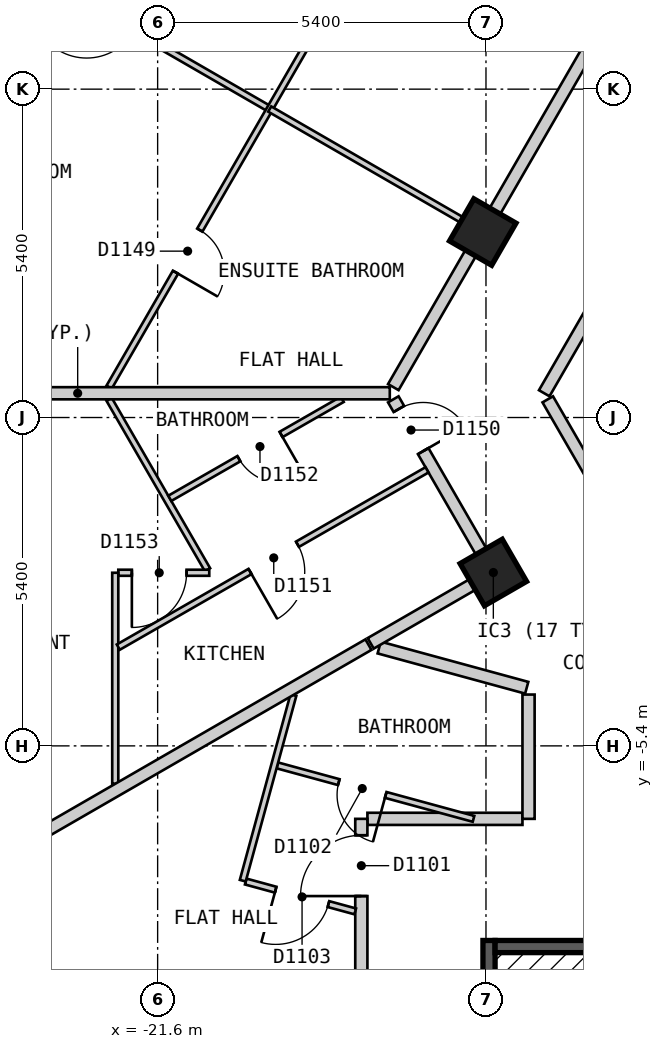
"""IFC4 building model, lengths in metres.
Left out: names, types, materials, properties, quantities, classifications, styles, units other than length and angle.
Written with IfcOpenShell. Run it as: python <this file> out.ifc"""

import sys

from ifc_helpers import new_model, si_unit, direction, frame, frame_2d, origin, origin_2d, place, context, subcontext, project, spatial, polyline, rectangle, outline, extrude, element, fill, save


model = new_model("IFC4")
c1 = context("Model", 3, precision=1e-05, world=origin(), true_north=direction((0.0, 1.0)))
c2 = subcontext(c1, "Body", "Model", "MODEL_VIEW")
j1 = project(units=[si_unit("LENGTHUNIT", "METRE"), si_unit("PLANEANGLEUNIT", "RADIAN")], contexts=[c1])
p1 = place(None, origin())
s1 = spatial("IfcSite", under=j1, at=p1, CompositionType="ELEMENT")
p2 = place(p1, origin())
s2 = spatial("IfcBuilding", under=s1, at=p2, CompositionType="ELEMENT")
p3 = place(p2, frame((0.0, 0.0, 150.6)))
s3 = spatial("IfcBuildingStorey", under=s2, at=p3, CompositionType="ELEMENT", Elevation=150.6)
for number, where, z_axis, x_axis in (
    (1, (-16.079, -2.549, 0.0), (0.0, 0.0, 1.0), (0.5, -0.866, 0.0)),
    (2, (-16.253, 3.05, 0.0), (0.0, 0.0, 1.0), (-0.5, -0.866, 0.0)),
):
    element("IfcColumn", number, at=place(p3, frame(where, z_axis=z_axis, x_axis=x_axis)), inside=s3, PredefinedType="COLUMN", context=c2, shape_type="SweptSolid", body=[
        extrude(rectangle(XDim=0.8, YDim=0.8, at=origin_2d()), origin(), (0.0, 0.0, 1.0), 3.0),
    ])
p4 = place(p3, frame((-16.555, 23.025, 0.0), z_axis=(0.0, 0.0, 1.0), x_axis=(-0.500020536353, -0.866013546791, 0.0)))
e3 = element("IfcWall", 3, at=p4, inside=s3, PredefinedType="SOLIDWALL", context=c2, shape_type="SweptSolid", body=[
    extrude(outline(polyline([(0.0, -0.15), (23.325, -0.15), (23.245, 0.15), (0.08, 0.15), (0.0, -0.15)])), origin(), (0.0, 0.0, 1.0), 2.6),
])
p5 = place(p4, frame((1.314, 0.0, 0.15)))
e4 = element("IfcOpeningElement", 4, at=p5, cuts=e3, PredefinedType="OPENING", context=c2, shape_type="SweptSolid", body=[
    extrude(rectangle(XDim=1.5, YDim=2.1, at=frame_2d((0.75, 1.05))), frame((0.0, 0.16, 0.0), z_axis=(0.0, -1.0, 0.0), x_axis=(1.0, 0.0, 0.0)), (0.0, 0.0, 1.0), 0.32),
])
p6 = place(p4, frame((4.056, 0.0, 0.15)))
e5 = element("IfcOpeningElement", 5, at=p6, cuts=e3, PredefinedType="OPENING", context=c2, shape_type="SweptSolid", body=[
    extrude(rectangle(XDim=1.5, YDim=2.1, at=frame_2d((0.75, 1.05))), frame((0.0, 0.16, 0.0), z_axis=(0.0, -1.0, 0.0), x_axis=(1.0, 0.0, 0.0)), (0.0, 0.0, 1.0), 0.32),
])
p7 = place(p4, frame((6.799, 0.0, 0.15)))
e6 = element("IfcOpeningElement", 6, at=p7, cuts=e3, PredefinedType="OPENING", context=c2, shape_type="SweptSolid", body=[
    extrude(rectangle(XDim=1.5, YDim=2.1, at=frame_2d((0.75, 1.05))), frame((0.0, 0.16, 0.0), z_axis=(0.0, -1.0, 0.0), x_axis=(1.0, 0.0, 0.0)), (0.0, 0.0, 1.0), 0.32),
])
p8 = place(p4, frame((9.541, 0.0, 0.15)))
e7 = element("IfcOpeningElement", 7, at=p8, cuts=e3, PredefinedType="OPENING", context=c2, shape_type="SweptSolid", body=[
    extrude(rectangle(XDim=1.5, YDim=2.1, at=frame_2d((0.75, 1.05))), frame((0.0, 0.16, 0.0), z_axis=(0.0, -1.0, 0.0), x_axis=(1.0, 0.0, 0.0)), (0.0, 0.0, 1.0), 0.32),
])
p9 = place(p4, frame((12.285, 0.0, 0.15)))
e8 = element("IfcOpeningElement", 8, at=p9, cuts=e3, PredefinedType="OPENING", context=c2, shape_type="SweptSolid", body=[
    extrude(rectangle(XDim=1.5, YDim=2.1, at=frame_2d((0.75, 1.05))), frame((0.0, 0.16, 0.0), z_axis=(0.0, -1.0, 0.0), x_axis=(1.0, 0.0, 0.0)), (0.0, 0.0, 1.0), 0.32),
])
p10 = place(p4, frame((15.027, 0.0, 0.15)))
e9 = element("IfcOpeningElement", 9, at=p10, cuts=e3, PredefinedType="OPENING", context=c2, shape_type="SweptSolid", body=[
    extrude(rectangle(XDim=1.5, YDim=2.1, at=frame_2d((0.75, 1.05))), frame((0.0, 0.16, 0.0), z_axis=(0.0, -1.0, 0.0), x_axis=(1.0, 0.0, 0.0)), (0.0, 0.0, 1.0), 0.32),
])
p11 = place(p4, frame((17.769, 0.0, 0.15)))
e10 = element("IfcOpeningElement", 10, at=p11, cuts=e3, PredefinedType="OPENING", context=c2, shape_type="SweptSolid", body=[
    extrude(rectangle(XDim=1.5, YDim=2.1, at=frame_2d((0.75, 1.05))), frame((0.0, 0.16, 0.0), z_axis=(0.0, -1.0, 0.0), x_axis=(1.0, 0.0, 0.0)), (0.0, 0.0, 1.0), 0.32),
])
p12 = place(p4, frame((20.512, 0.0, 0.15)))
e11 = element("IfcOpeningElement", 11, at=p12, cuts=e3, PredefinedType="OPENING", context=c2, shape_type="SweptSolid", body=[
    extrude(rectangle(XDim=1.5, YDim=2.1, at=frame_2d((0.75, 1.05))), frame((0.0, 0.16, 0.0), z_axis=(0.0, -1.0, 0.0), x_axis=(1.0, 0.0, 0.0)), (0.0, 0.0, 1.0), 0.32),
])
p13 = place(p3, frame((-28.218, -2.025, 0.0), z_axis=(0.0, 0.0, 1.0), x_axis=(0.500017503135, -0.866015298109, 0.0)))
e12 = element("IfcWall", 12, at=p13, inside=s3, PredefinedType="SOLIDWALL", context=c2, shape_type="SweptSolid", body=[
    extrude(outline(polyline([(0.0, -0.15), (24.711, -0.15), (24.631, 0.15), (0.08, 0.15), (0.0, -0.15)])), origin(), (0.0, 0.0, 1.0), 2.6),
])
p14 = place(p13, frame((1.4, 0.0, 0.15)))
e13 = element("IfcOpeningElement", 13, at=p14, cuts=e12, PredefinedType="OPENING", context=c2, shape_type="SweptSolid", body=[
    extrude(rectangle(XDim=1.5, YDim=2.1, at=frame_2d((0.75, 1.05))), frame((0.0, 0.16, 0.0), z_axis=(0.0, -1.0, 0.0), x_axis=(1.0, 0.0, 0.0)), (0.0, 0.0, 1.0), 0.32),
])
p15 = place(p13, frame((4.316, 0.0, 0.15)))
e14 = element("IfcOpeningElement", 14, at=p15, cuts=e12, PredefinedType="OPENING", context=c2, shape_type="SweptSolid", body=[
    extrude(rectangle(XDim=1.5, YDim=2.1, at=frame_2d((0.75, 1.05))), frame((0.0, 0.16, 0.0), z_axis=(0.0, -1.0, 0.0), x_axis=(1.0, 0.0, 0.0)), (0.0, 0.0, 1.0), 0.32),
])
p16 = place(p13, frame((7.231, 0.0, 0.15)))
e15 = element("IfcOpeningElement", 15, at=p16, cuts=e12, PredefinedType="OPENING", context=c2, shape_type="SweptSolid", body=[
    extrude(rectangle(XDim=1.5, YDim=2.1, at=frame_2d((0.75, 1.05))), frame((0.0, 0.16, 0.0), z_axis=(0.0, -1.0, 0.0), x_axis=(1.0, 0.0, 0.0)), (0.0, 0.0, 1.0), 0.32),
])
p17 = place(p13, frame((10.147, 0.0, 0.15)))
e16 = element("IfcOpeningElement", 16, at=p17, cuts=e12, PredefinedType="OPENING", context=c2, shape_type="SweptSolid", body=[
    extrude(rectangle(XDim=1.5, YDim=2.1, at=frame_2d((0.75, 1.05))), frame((0.0, 0.16, 0.0), z_axis=(0.0, -1.0, 0.0), x_axis=(1.0, 0.0, 0.0)), (0.0, 0.0, 1.0), 0.32),
])
p18 = place(p13, frame((13.062, 0.0, 0.15)))
e17 = element("IfcOpeningElement", 17, at=p18, cuts=e12, PredefinedType="OPENING", context=c2, shape_type="SweptSolid", body=[
    extrude(rectangle(XDim=1.5, YDim=2.1, at=frame_2d((0.75, 1.05))), frame((0.0, 0.16, 0.0), z_axis=(0.0, -1.0, 0.0), x_axis=(1.0, 0.0, 0.0)), (0.0, 0.0, 1.0), 0.32),
])
p19 = place(p13, frame((15.977, 0.0, 0.15)))
e18 = element("IfcOpeningElement", 18, at=p19, cuts=e12, PredefinedType="OPENING", context=c2, shape_type="SweptSolid", body=[
    extrude(rectangle(XDim=1.5, YDim=2.1, at=frame_2d((0.75, 1.05))), frame((0.0, 0.16, 0.0), z_axis=(0.0, -1.0, 0.0), x_axis=(1.0, 0.0, 0.0)), (0.0, 0.0, 1.0), 0.32),
])
p20 = place(p13, frame((18.893, 0.0, 0.15)))
e19 = element("IfcOpeningElement", 19, at=p20, cuts=e12, PredefinedType="OPENING", context=c2, shape_type="SweptSolid", body=[
    extrude(rectangle(XDim=1.5, YDim=2.1, at=frame_2d((0.75, 1.05))), frame((0.0, 0.16, 0.0), z_axis=(0.0, -1.0, 0.0), x_axis=(1.0, 0.0, 0.0)), (0.0, 0.0, 1.0), 0.32),
])
p21 = place(p13, frame((21.809, 0.0, 0.15)))
e20 = element("IfcOpeningElement", 20, at=p21, cuts=e12, PredefinedType="OPENING", context=c2, shape_type="SweptSolid", body=[
    extrude(rectangle(XDim=1.5, YDim=2.1, at=frame_2d((0.75, 1.05))), frame((0.0, 0.16, 0.0), z_axis=(0.0, -1.0, 0.0), x_axis=(1.0, 0.0, 0.0)), (0.0, 0.0, 1.0), 0.32),
])
p22 = place(p3, frame((-15.184, 0.299, 0.0), z_axis=(0.0, 0.0, 1.0), x_axis=(0.500149577091, -0.865939028186, 0.0)))
e21 = element("IfcWall", 21, at=p22, inside=s3, PredefinedType="PARTITIONING", context=c2, shape_type="SweptSolid", body=[
    extrude(rectangle(XDim=3.463, YDim=0.2, at=frame_2d((1.732, 0.0))), origin(), (0.0, 0.0, 1.0), 2.6),
])
p23 = place(p3, frame((-17.724, 0.299, 0.0), z_axis=(0.0, 0.0, 1.0), x_axis=(0.499910220442, -0.866077231832, 0.0)))
e22 = element("IfcWall", 22, at=p23, inside=s3, PredefinedType="PARTITIONING", context=c2, shape_type="SweptSolid", body=[
    extrude(rectangle(XDim=3.189, YDim=0.2, at=frame_2d((1.594, 0.0))), origin(), (0.0, 0.0, 1.0), 2.6),
])
p24 = place(p23, frame((0.183, 0.0, 0.0)))
e23 = element("IfcOpeningElement", 23, at=p24, cuts=e22, PredefinedType="OPENING", context=c2, shape_type="SweptSolid", body=[
    extrude(rectangle(XDim=0.8, YDim=2.1, at=frame_2d((0.4, 1.05))), frame((0.0, 0.11, 0.0), z_axis=(0.0, -1.0, 0.0), x_axis=(1.0, 0.0, 0.0)), (0.0, 0.0, 1.0), 0.22),
])
p25 = place(p3, frame((-18.15, -6.6, 0.0), z_axis=(0.0, 0.0, 1.0), x_axis=(1.0, 0.0, 0.0)))
e24 = element("IfcWall", 24, at=p25, inside=s3, PredefinedType="PARTITIONING", context=c2, shape_type="SweptSolid", body=[
    extrude(rectangle(XDim=2.55, YDim=0.2, at=frame_2d((1.275, 0.0))), origin(), (0.0, 0.0, 1.0), 2.6),
])
p26 = place(p3, frame((-15.242, 0.399, 0.0), z_axis=(0.0, 0.0, 1.0), x_axis=(0.499953615651, 0.866052182145, 0.0)))
e25 = element("IfcWall", 25, at=p26, inside=s3, PredefinedType="PARTITIONING", context=c2, shape_type="SweptSolid", body=[
    extrude(rectangle(XDim=8.777, YDim=0.2, at=frame_2d((4.388, 0.0))), origin(), (0.0, 0.0, 1.0), 2.6),
])
p27 = place(p26, frame((3.938, 0.0, 0.0)))
e26 = element("IfcOpeningElement", 26, at=p27, cuts=e25, PredefinedType="OPENING", context=c2, shape_type="SweptSolid", body=[
    extrude(rectangle(XDim=0.9, YDim=2.1, at=frame_2d((0.45, 1.05))), frame((0.0, 0.11, 0.0), z_axis=(0.0, -1.0, 0.0), x_axis=(1.0, 0.0, 0.0)), (0.0, 0.0, 1.0), 0.22),
])
p28 = place(p3, frame((-17.724, 0.5, 0.0), z_axis=(0.0, 0.0, 1.0), x_axis=(0.499992388462, 0.866029798263, 0.0)))
e27 = element("IfcWall", 27, at=p28, inside=s3, PredefinedType="PARTITIONING", context=c2, shape_type="SweptSolid", body=[
    extrude(rectangle(XDim=16.859, YDim=0.2, at=frame_2d((8.429, 0.0))), origin(), (0.0, 0.0, 1.0), 2.6),
])
p29 = place(p28, frame((10.672, 0.0, 0.0)))
e28 = element("IfcOpeningElement", 28, at=p29, cuts=e27, PredefinedType="OPENING", context=c2, shape_type="SweptSolid", body=[
    extrude(rectangle(XDim=1.0, YDim=2.1, at=frame_2d((0.5, 1.05))), frame((0.0, 0.11, 0.0), z_axis=(0.0, -1.0, 0.0), x_axis=(1.0, 0.0, 0.0)), (0.0, 0.0, 1.0), 0.22),
])
p30 = place(p3, frame((-15.5, -6.6, 0.0), z_axis=(0.0, 0.0, 1.0), x_axis=(0.0, 1.0, 0.0)))
e29 = element("IfcWall", 29, at=p30, inside=s3, PredefinedType="PARTITIONING", context=c2, shape_type="SweptSolid", body=[
    extrude(rectangle(XDim=2.044, YDim=0.2, at=frame_2d((1.022, 0.0))), origin(), (0.0, 0.0, 1.0), 2.6),
])
p31 = place(p3, frame((-18.25, -10.478, 0.0), z_axis=(0.0, 0.0, 1.0), x_axis=(0.0, 1.0, 0.0)))
e30 = element("IfcWall", 30, at=p31, inside=s3, PredefinedType="PARTITIONING", context=c2, shape_type="SweptSolid", body=[
    extrude(rectangle(XDim=3.878, YDim=0.2, at=frame_2d((1.939, 0.0))), origin(), (0.0, 0.0, 1.0), 2.6),
])
p32 = place(p31, frame((2.608, 0.0, 0.0)))
e31 = element("IfcOpeningElement", 31, at=p32, cuts=e30, PredefinedType="OPENING", context=c2, shape_type="SweptSolid", body=[
    extrude(rectangle(XDim=1.0, YDim=2.1, at=frame_2d((0.5, 1.05))), frame((0.0, 0.11, 0.0), z_axis=(0.0, -1.0, 0.0), x_axis=(1.0, 0.0, 0.0)), (0.0, 0.0, 1.0), 0.22),
])
p33 = place(p3, frame((-22.398, 0.299, 0.0), z_axis=(0.0, 0.0, 1.0), x_axis=(0.50004249738, -0.86600086652, 0.0)))
e32 = element("IfcWall", 32, at=p33, inside=s3, PredefinedType="PARTITIONING", context=c2, shape_type="SweptSolid", body=[
    extrude(rectangle(XDim=3.236, YDim=0.1, at=frame_2d((1.618, 0.0))), origin(), (0.0, 0.0, 1.0), 2.6),
])
p34 = place(p3, frame((-19.631, -5.721, 0.0), z_axis=(0.0, 0.0, 1.0), x_axis=(0.964816035809, -0.262925877475, 0.0)))
e33 = element("IfcWall", 33, at=p34, inside=s3, PredefinedType="PARTITIONING", context=c2, shape_type="SweptSolid", body=[
    extrude(rectangle(XDim=3.344, YDim=0.1, at=frame_2d((1.672, 0.0))), origin(), (0.0, 0.0, 1.0), 2.6),
])
p35 = place(p34, frame((1.047, 0.0, 0.0)))
e34 = element("IfcOpeningElement", 34, at=p35, cuts=e33, PredefinedType="OPENING", context=c2, shape_type="SweptSolid", body=[
    extrude(rectangle(XDim=0.8, YDim=2.1, at=frame_2d((0.4, 1.05))), frame((0.0, 0.06, 0.0), z_axis=(0.0, -1.0, 0.0), x_axis=(1.0, 0.0, 0.0)), (0.0, 0.0, 1.0), 0.12),
])
p36 = place(p3, frame((-20.151, -7.631, 0.0), z_axis=(0.0, 0.0, 1.0), x_axis=(0.964784947449, -0.263039930765, 0.0)))
e35 = element("IfcWall", 35, at=p36, inside=s3, PredefinedType="PARTITIONING", context=c2, shape_type="SweptSolid", body=[
    extrude(rectangle(XDim=1.866, YDim=0.1, at=frame_2d((0.933, 0.0))), origin(), (0.0, 0.0, 1.0), 2.6),
])
p37 = place(p36, frame((0.51, 0.0, 0.0)))
e36 = element("IfcOpeningElement", 36, at=p37, cuts=e35, PredefinedType="OPENING", context=c2, shape_type="SweptSolid", body=[
    extrude(rectangle(XDim=0.9, YDim=2.1, at=frame_2d((0.45, 1.05))), frame((0.0, 0.06, 0.0), z_axis=(0.0, -1.0, 0.0), x_axis=(1.0, 0.0, 0.0)), (0.0, 0.0, 1.0), 0.12),
])
p38 = place(p3, frame((-24.999, 8.1, 0.0), z_axis=(0.0, 0.0, 1.0), x_axis=(0.865978029808, -0.500082045158, 0.0)))
e37 = element("IfcWall", 37, at=p38, inside=s3, PredefinedType="PARTITIONING", context=c2, shape_type="SweptSolid", body=[
    extrude(rectangle(XDim=6.053, YDim=0.1, at=frame_2d((3.027, 0.0))), origin(), (0.0, 0.0, 1.0), 2.6),
])
p39 = place(p38, frame((2.577, 0.0, 0.0)))
e38 = element("IfcOpeningElement", 38, at=p39, cuts=e37, PredefinedType="OPENING", context=c2, shape_type="SweptSolid", body=[
    extrude(rectangle(XDim=0.9, YDim=2.1, at=frame_2d((0.45, 1.05))), frame((0.0, 0.06, 0.0), z_axis=(0.0, -1.0, 0.0), x_axis=(1.0, 0.0, 0.0)), (0.0, 0.0, 1.0), 0.12),
])
p40 = place(p3, frame((-22.247, -2.553, 0.0), z_axis=(0.0, 0.0, 1.0), x_axis=(1.0, 0.0, 0.0)))
e39 = element("IfcWall", 39, at=p40, inside=s3, PredefinedType="PARTITIONING", context=c2, shape_type="SweptSolid", body=[
    extrude(rectangle(XDim=1.496, YDim=0.1, at=frame_2d((0.748, 0.0))), origin(), (0.0, 0.0, 1.0), 2.6),
])
p41 = place(p40, frame((0.223, 0.0, 0.0)))
e40 = element("IfcOpeningElement", 40, at=p41, cuts=e39, PredefinedType="OPENING", context=c2, shape_type="SweptSolid", body=[
    extrude(rectangle(XDim=0.9, YDim=2.1, at=frame_2d((0.45, 1.05))), frame((0.0, 0.06, 0.0), z_axis=(0.0, -1.0, 0.0), x_axis=(1.0, 0.0, 0.0)), (0.0, 0.0, 1.0), 0.12),
])
p42 = place(p3, frame((-22.398, 0.499, 0.0), z_axis=(0.0, 0.0, 1.0), x_axis=(0.499981561717, 0.866036048871, 0.0)))
e41 = element("IfcWall", 41, at=p42, inside=s3, PredefinedType="PARTITIONING", context=c2, shape_type="SweptSolid", body=[
    extrude(rectangle(XDim=21.532, YDim=0.1, at=frame_2d((10.766, 0.0))), origin(), (0.0, 0.0, 1.0), 2.6),
])
p43 = place(p42, frame((13.049, 0.0, 0.0)))
e42 = element("IfcOpeningElement", 42, at=p43, cuts=e41, PredefinedType="OPENING", context=c2, shape_type="SweptSolid", body=[
    extrude(rectangle(XDim=0.9, YDim=2.1, at=frame_2d((0.45, 1.05))), frame((0.0, 0.06, 0.0), z_axis=(0.0, -1.0, 0.0), x_axis=(1.0, 0.0, 0.0)), (0.0, 0.0, 1.0), 0.12),
])
p44 = place(p42, frame((2.183, 0.0, 0.0)))
e43 = element("IfcOpeningElement", 43, at=p44, cuts=e41, PredefinedType="OPENING", context=c2, shape_type="SweptSolid", body=[
    extrude(rectangle(XDim=0.8, YDim=2.1, at=frame_2d((0.4, 1.05))), frame((0.0, 0.06, 0.0), z_axis=(0.0, -1.0, 0.0), x_axis=(1.0, 0.0, 0.0)), (0.0, 0.0, 1.0), 0.12),
])
p45 = place(p3, frame((-20.2, -7.617, 0.0), z_axis=(0.0, 0.0, 1.0), x_axis=(0.263150035392, 0.964754921663, 0.0)))
e44 = element("IfcWall", 44, at=p45, inside=s3, PredefinedType="PARTITIONING", context=c2, shape_type="SweptSolid", body=[
    extrude(rectangle(XDim=3.166, YDim=0.1, at=frame_2d((1.583, 0.0))), origin(), (0.0, 0.0, 1.0), 2.6),
])
p46 = place(p3, frame((-22.297, -6.023, 0.0), z_axis=(0.0, 0.0, 1.0), x_axis=(0.0, 1.0, 0.0)))
e45 = element("IfcWall", 45, at=p46, inside=s3, PredefinedType="PARTITIONING", context=c2, shape_type="SweptSolid", body=[
    extrude(rectangle(XDim=3.47, YDim=0.1, at=frame_2d((1.735, 0.0))), origin(), (0.0, 0.0, 1.0), 2.6),
])
p47 = place(p3, frame((-22.247, -3.776, 0.0), z_axis=(0.0, 0.0, 1.0), x_axis=(0.867243093247, 0.497884943752, 0.0)))
e46 = element("IfcWall", 46, at=p47, inside=s3, PredefinedType="PARTITIONING", context=c2, shape_type="SweptSolid", body=[
    extrude(rectangle(XDim=5.854, YDim=0.1, at=frame_2d((2.927, 0.0))), origin(), (0.0, 0.0, 1.0), 2.6),
])
p48 = place(p47, frame((2.498, 0.0, 0.0)))
e47 = element("IfcOpeningElement", 47, at=p48, cuts=e46, PredefinedType="OPENING", context=c2, shape_type="SweptSolid", body=[
    extrude(rectangle(XDim=0.9, YDim=2.1, at=frame_2d((0.45, 1.05))), frame((0.0, 0.06, 0.0), z_axis=(0.0, -1.0, 0.0), x_axis=(1.0, 0.0, 0.0)), (0.0, 0.0, 1.0), 0.12),
])
p49 = place(p3, frame((-21.4, -1.329, 0.0), z_axis=(0.0, 0.0, 1.0), x_axis=(0.867235187435, 0.497898714274, 0.0)))
e48 = element("IfcWall", 48, at=p49, inside=s3, PredefinedType="PARTITIONING", context=c2, shape_type="SweptSolid", body=[
    extrude(rectangle(XDim=3.27, YDim=0.1, at=frame_2d((1.635, 0.0))), origin(), (0.0, 0.0, 1.0), 2.6),
])
p50 = place(p49, frame((1.31, 0.0, 0.0)))
e49 = element("IfcOpeningElement", 49, at=p50, cuts=e48, PredefinedType="OPENING", context=c2, shape_type="SweptSolid", body=[
    extrude(rectangle(XDim=0.8, YDim=2.1, at=frame_2d((0.4, 1.05))), frame((0.0, 0.06, 0.0), z_axis=(0.0, -1.0, 0.0), x_axis=(1.0, 0.0, 0.0)), (0.0, 0.0, 1.0), 0.12),
])
p51 = place(p3, frame((-17.956, -3.783, 0.0), z_axis=(0.0, 0.0, 1.0), x_axis=(0.964815336827, -0.2629284424, 0.0)))
e50 = element("IfcWall", 50, at=p51, inside=s3, PredefinedType="PARTITIONING", context=c2, shape_type="SweptSolid", body=[
    extrude(rectangle(XDim=2.514, YDim=0.2, at=frame_2d((1.257, 0.0))), origin(), (0.0, 0.0, 1.0), 2.6),
])
p52 = place(p3, frame((-28.048, 0.399, 0.0), z_axis=(0.0, 0.0, 1.0), x_axis=(1.0, 0.0, 0.0)))
e51 = element("IfcWall", 51, at=p52, inside=s3, PredefinedType="PARTITIONING", context=c2, shape_type="SweptSolid", body=[
    extrude(rectangle(XDim=10.266, YDim=0.2, at=frame_2d((5.133, 0.0))), origin(), (0.0, 0.0, 1.0), 2.6),
])
p53 = place(p3, frame((-24.826, -7.599, 0.0), z_axis=(0.0, 0.0, 1.0), x_axis=(0.866031973572, 0.499988620622, 0.0)))
e52 = element("IfcWall", 52, at=p53, inside=s3, PredefinedType="PARTITIONING", context=c2, shape_type="SweptSolid", body=[
    extrude(rectangle(XDim=7.728, YDim=0.2, at=frame_2d((3.864, 0.0))), origin(), (0.0, 0.0, 1.0), 2.6),
])
p54 = place(p3, frame((-18.096, -3.714, 0.0), z_axis=(0.0, 0.0, 1.0), x_axis=(0.865794513859, 0.500399700011, 0.0)))
e53 = element("IfcWall", 53, at=p54, inside=s3, PredefinedType="PARTITIONING", context=c2, shape_type="SweptSolid", body=[
    extrude(rectangle(XDim=2.298, YDim=0.2, at=frame_2d((1.149, 0.0))), origin(), (0.0, 0.0, 1.0), 2.6),
])
p55 = place(p3, frame((-19.757, 5.073, 0.0), z_axis=(0.0, 0.0, 1.0), x_axis=(0.866076396086, -0.499911668341, 0.0)))
e54 = element("IfcWall", 54, at=p55, inside=s3, PredefinedType="PARTITIONING", context=c2, shape_type="SweptSolid", body=[
    extrude(rectangle(XDim=3.947, YDim=0.1, at=frame_2d((1.973, 0.0))), origin(), (0.0, 0.0, 1.0), 2.6),
])
p56 = place(p3, frame((-16.15, -14.4, 0.0), z_axis=(0.0, 0.0, 1.0), x_axis=(0.0, 1.0, 0.0)))
e55 = element("IfcWall", 55, at=p56, inside=s3, PredefinedType="SOLIDWALL", context=c2, shape_type="SweptSolid", body=[
    extrude(rectangle(XDim=5.8, YDim=0.2, at=frame_2d((2.9, 0.0))), origin(), (0.0, 0.0, 1.0), 2.6),
])
p57 = place(p3, frame((-16.05, -8.7, 0.0), z_axis=(0.0, 0.0, 1.0), x_axis=(1.0, 0.0, 0.0)))
e56 = element("IfcWall", 56, at=p57, inside=s3, PredefinedType="SOLIDWALL", context=c2, shape_type="SweptSolid", body=[
    extrude(rectangle(XDim=2.75, YDim=0.2, at=frame_2d((1.375, 0.0))), origin(), (0.0, 0.0, 1.0), 2.6),
])
p58 = place(p32, origin())
e57 = element("IfcDoor", 57, at=p58, inside=s3, OperationType="SINGLE_SWING_LEFT", PredefinedType="DOOR", context=c2, shape_type="SweptSolid", body=[
    extrude(rectangle(XDim=1.0, YDim=2.1, at=frame_2d((0.5, 1.05))), frame((0.0, 0.025, 0.0), z_axis=(0.0, -1.0, 0.0), x_axis=(1.0, 0.0, 0.0)), (0.0, 0.0, 1.0), 0.05),
])
fill(e31, e57)
p59 = place(p35, origin())
e58 = element("IfcDoor", 58, at=p59, inside=s3, OperationType="SINGLE_SWING_RIGHT", PredefinedType="DOOR", context=c2, shape_type="SweptSolid", body=[
    extrude(rectangle(XDim=0.8, YDim=2.1, at=frame_2d((0.4, 1.05))), frame((0.0, 0.025, 0.0), z_axis=(0.0, -1.0, 0.0), x_axis=(1.0, 0.0, 0.0)), (0.0, 0.0, 1.0), 0.05),
])
fill(e34, e58)
p60 = place(p37, origin())
e59 = element("IfcDoor", 59, at=p60, inside=s3, OperationType="SINGLE_SWING_LEFT", PredefinedType="DOOR", context=c2, shape_type="SweptSolid", body=[
    extrude(rectangle(XDim=0.9, YDim=2.1, at=frame_2d((0.45, 1.05))), frame((0.0, 0.025, 0.0), z_axis=(0.0, -1.0, 0.0), x_axis=(1.0, 0.0, 0.0)), (0.0, 0.0, 1.0), 0.05),
])
fill(e36, e59)
p61 = place(p44, origin())
e60 = element("IfcDoor", 60, at=p61, inside=s3, OperationType="SINGLE_SWING_LEFT", PredefinedType="DOOR", context=c2, shape_type="SweptSolid", body=[
    extrude(rectangle(XDim=0.8, YDim=2.1, at=frame_2d((0.4, 1.05))), frame((0.0, 0.025, 0.0), z_axis=(0.0, -1.0, 0.0), x_axis=(1.0, 0.0, 0.0)), (0.0, 0.0, 1.0), 0.05),
])
fill(e43, e60)
p62 = place(p24, origin())
e61 = element("IfcDoor", 61, at=p62, inside=s3, OperationType="SINGLE_SWING_RIGHT", PredefinedType="DOOR", context=c2, shape_type="SweptSolid", body=[
    extrude(rectangle(XDim=0.8, YDim=2.1, at=frame_2d((0.4, 1.05))), frame((0.0, 0.025, 0.0), z_axis=(0.0, -1.0, 0.0), x_axis=(1.0, 0.0, 0.0)), (0.0, 0.0, 1.0), 0.05),
])
fill(e23, e61)
p63 = place(p48, origin())
e62 = element("IfcDoor", 62, at=p63, inside=s3, OperationType="SINGLE_SWING_LEFT", PredefinedType="DOOR", context=c2, shape_type="SweptSolid", body=[
    extrude(rectangle(XDim=0.9, YDim=2.1, at=frame_2d((0.45, 1.05))), frame((0.0, 0.025, 0.0), z_axis=(0.0, -1.0, 0.0), x_axis=(1.0, 0.0, 0.0)), (0.0, 0.0, 1.0), 0.05),
])
fill(e47, e62)
p64 = place(p50, origin())
e63 = element("IfcDoor", 63, at=p64, inside=s3, OperationType="SINGLE_SWING_RIGHT", PredefinedType="DOOR", context=c2, shape_type="SweptSolid", body=[
    extrude(rectangle(XDim=0.8, YDim=2.1, at=frame_2d((0.4, 1.05))), frame((0.0, 0.025, 0.0), z_axis=(0.0, -1.0, 0.0), x_axis=(1.0, 0.0, 0.0)), (0.0, 0.0, 1.0), 0.05),
])
fill(e49, e63)
p65 = place(p41, origin())
e64 = element("IfcDoor", 64, at=p65, inside=s3, OperationType="SINGLE_SWING_LEFT", PredefinedType="DOOR", context=c2, shape_type="SweptSolid", body=[
    extrude(rectangle(XDim=0.9, YDim=2.1, at=frame_2d((0.45, 1.05))), frame((0.0, 0.025, 0.0), z_axis=(0.0, -1.0, 0.0), x_axis=(1.0, 0.0, 0.0)), (0.0, 0.0, 1.0), 0.05),
])
fill(e40, e64)
save(model, sys.argv[1])
